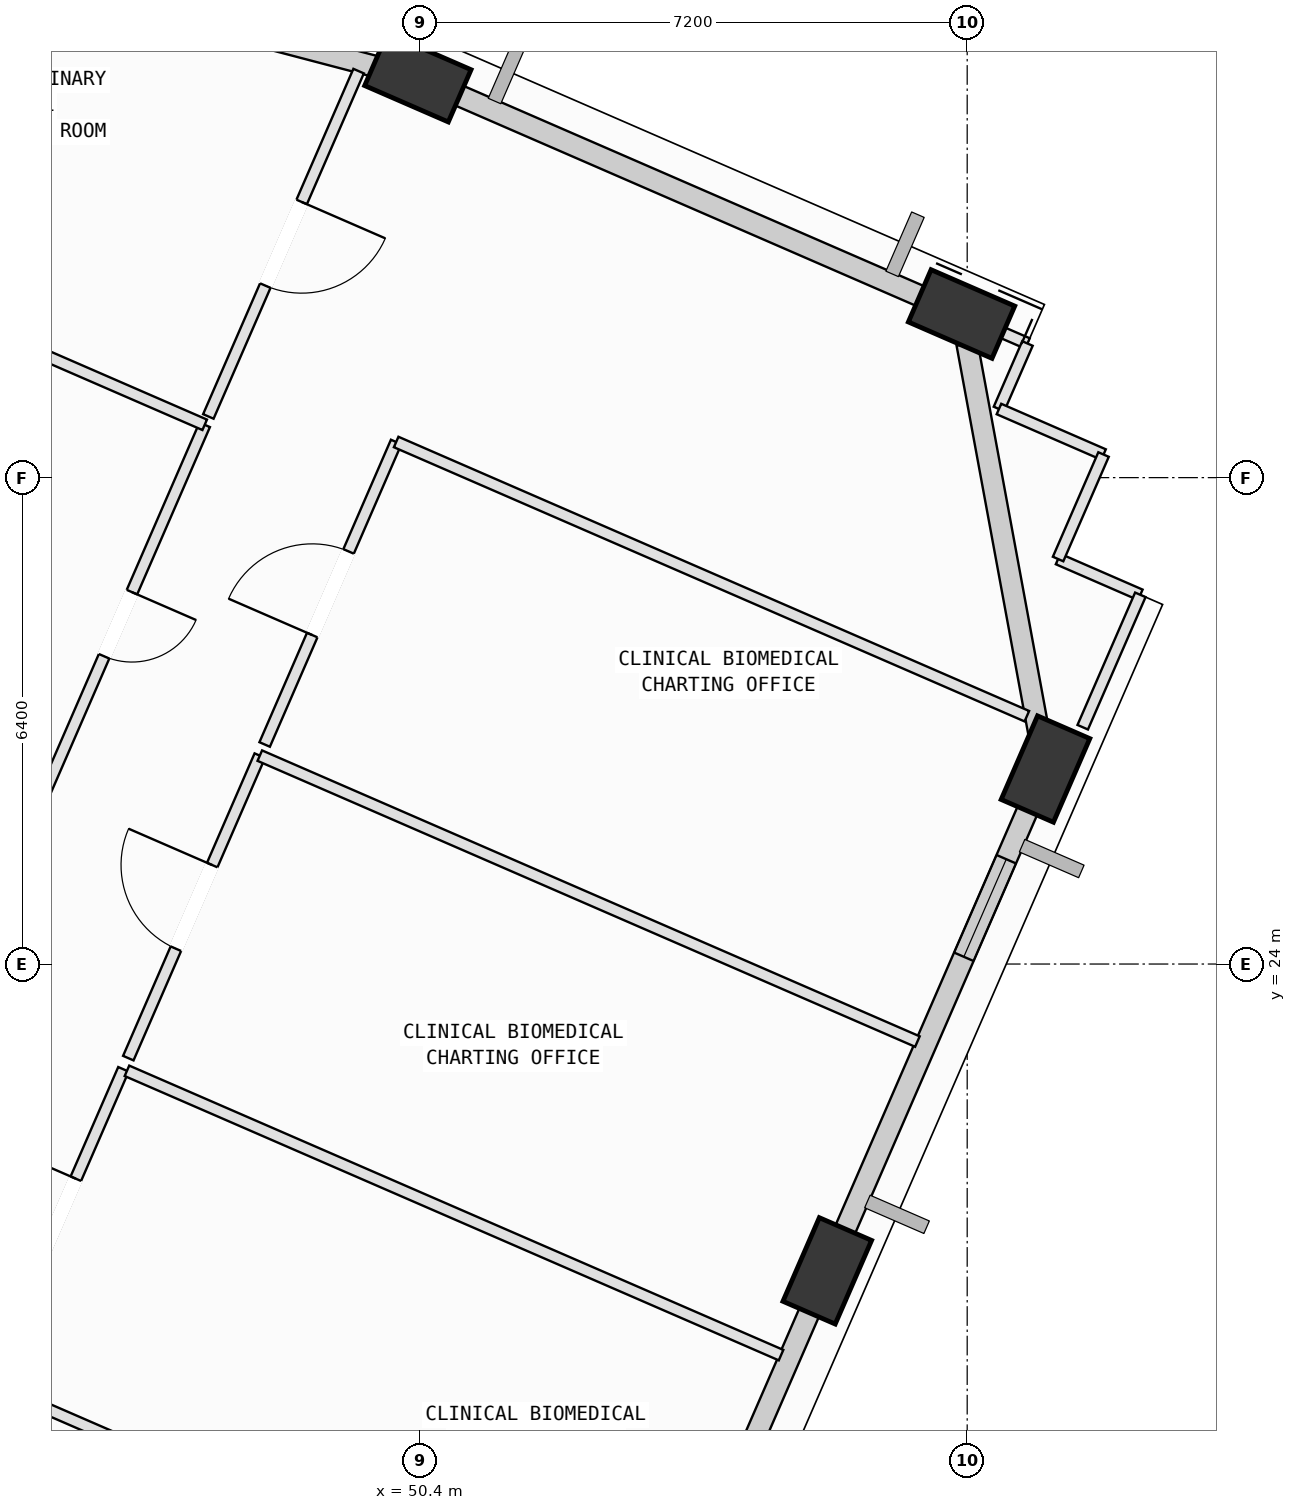
"""IFC4 building model, lengths in metres.
Left out: names, types, materials, properties, quantities, classifications, styles, units other than length and angle.
Written with IfcOpenShell. Run it as: python <this file> out.ifc"""

import sys

from ifc_helpers import new_model, si_unit, direction, frame, frame_2d, origin, origin_2d, place, context, subcontext, project, spatial, rectangle, extrude, element, fill, save


model = new_model("IFC4")
c1 = context("Model", 3, precision=1e-05, world=origin(), true_north=direction((0.0, 1.0)))
c2 = subcontext(c1, "Body", "Model", "MODEL_VIEW")
j1 = project(units=[si_unit("LENGTHUNIT", "METRE"), si_unit("PLANEANGLEUNIT", "RADIAN")], contexts=[c1])
p1 = place(None, origin())
s1 = spatial("IfcSite", under=j1, at=p1, CompositionType="ELEMENT")
p2 = place(p1, origin())
s2 = spatial("IfcBuilding", under=s1, at=p2, CompositionType="ELEMENT")
p3 = place(p2, frame((0.0, 0.0, 324.6)))
s3 = spatial("IfcBuildingStorey", under=s2, at=p3, CompositionType="ELEMENT", Elevation=324.6)
for number, where, z_axis, x_axis in (
    (1, (55.759, 19.963, 0.002), (0.0, 0.0, 1.0), (0.399, 0.917, 0.0)),
    (2, (58.63, 26.566, 0.002), (0.0, 0.0, 1.0), (0.399, 0.917, 0.0)),
    (3, (57.526, 32.553, 0.002), (0.0, 0.0, 1.0), (-0.917, 0.399, 0.0)),
    (4, (50.373, 35.663, 0.002), (0.0, 0.0, 1.0), (-0.917, 0.399, 0.0)),
):
    element("IfcColumn", number, at=place(p3, frame(where, z_axis=z_axis, x_axis=x_axis)), inside=s3, PredefinedType="COLUMN", context=c2, shape_type="SweptSolid", body=[
        extrude(rectangle(XDim=1.2, YDim=0.75, at=origin_2d()), origin(), (0.0, 0.0, 1.0), 3.996),
    ])
p4 = place(p3, frame((55.601, 19.598, 0.0), z_axis=(0.0, 0.0, 1.0), x_axis=(-0.398765026274, -0.917053135767, 0.0)))
e5 = element("IfcWall", 5, at=p4, inside=s3, PredefinedType="SOLIDWALL", context=c2, shape_type="SweptSolid", body=[
    extrude(rectangle(XDim=5.964, YDim=0.28, at=frame_2d((2.982, 0.0))), origin(), (0.0, 0.0, 1.0), 3.265),
])
p5 = place(p4, frame((2.032, 0.0, 0.75)))
e6 = element("IfcOpeningElement", 6, at=p5, cuts=e5, PredefinedType="OPENING", context=c2, shape_type="SweptSolid", body=[
    extrude(rectangle(XDim=2.0, YDim=1.95, at=frame_2d((1.0, 0.975))), frame((0.0, 0.15, 0.0), z_axis=(0.0, -1.0, 0.0), x_axis=(1.0, 0.0, 0.0)), (0.0, 0.0, 1.0), 0.3),
])
p6 = place(p3, frame((58.472, 26.201, 0.0), z_axis=(0.0, 0.0, 1.0), x_axis=(-0.398776286617, -0.917048239316, 0.0)))
e7 = element("IfcWall", 7, at=p6, inside=s3, PredefinedType="SOLIDWALL", context=c2, shape_type="SweptSolid", body=[
    extrude(rectangle(XDim=6.405, YDim=0.28, at=frame_2d((3.203, 0.0))), origin(), (0.0, 0.0, 1.0), 3.265),
])
p7 = place(p6, frame((0.896, 0.0, 0.75)))
e8 = element("IfcOpeningElement", 8, at=p7, cuts=e7, PredefinedType="OPENING", context=c2, shape_type="SweptSolid", body=[
    extrude(rectangle(XDim=1.4, YDim=1.85, at=frame_2d((0.7, 0.925))), frame((0.0, 0.15, 0.0), z_axis=(0.0, -1.0, 0.0), x_axis=(1.0, 0.0, 0.0)), (0.0, 0.0, 1.0), 0.3),
])
p8 = place(p3, frame((57.598, 32.162, 0.0), z_axis=(0.0, 0.0, 1.0), x_axis=(0.181421889976, -0.983405357845, 0.0)))
e9 = element("IfcWall", 9, at=p8, inside=s3, PredefinedType="SOLIDWALL", context=c2, shape_type="SweptSolid", body=[
    extrude(rectangle(XDim=5.293, YDim=0.28, at=frame_2d((2.646, 0.0))), origin(), (0.0, 0.0, 1.0), 3.265),
])
p9 = place(p3, frame((50.737, 35.504, 0.0), z_axis=(0.0, 0.0, 1.0), x_axis=(0.917057311373, -0.398755423359, 0.0)))
e10 = element("IfcWall", 10, at=p9, inside=s3, PredefinedType="SOLIDWALL", context=c2, shape_type="SweptSolid", body=[
    extrude(rectangle(XDim=7.005, YDim=0.28, at=frame_2d((3.502, 0.0))), origin(), (0.0, 0.0, 1.0), 3.265),
])
p10 = place(p3, frame((41.264, 38.054, 0.0), z_axis=(0.0, 0.0, 1.0), x_axis=(0.967228971308, -0.253905724755, 0.0)))
e11 = element("IfcWall", 11, at=p10, inside=s3, PredefinedType="SOLIDWALL", context=c2, shape_type="SweptSolid", body=[
    extrude(rectangle(XDim=9.02, YDim=0.28, at=frame_2d((4.51, 0.0))), origin(), (0.0, 0.0, 1.0), 3.265),
])
p11 = place(p3, frame((44.704, 18.489, 0.0), z_axis=(0.0, 0.0, 1.0), x_axis=(0.917075404025, -0.398713811315, 0.0)))
e12 = element("IfcWall", 12, at=p11, inside=s3, PredefinedType="PARTITIONING", context=c2, shape_type="SweptSolid", body=[
    extrude(rectangle(XDim=9.435, YDim=0.15, at=frame_2d((4.718, 0.0))), origin(), (0.0, 0.0, 1.0), 3.78),
])
p12 = place(p3, frame((44.768, 18.635, 0.0), z_axis=(0.0, 0.0, 1.0), x_axis=(0.398828954963, 0.91702533481, 0.0)))
e13 = element("IfcWall", 13, at=p12, inside=s3, PredefinedType="PARTITIONING", context=c2, shape_type="SweptSolid", body=[
    extrude(rectangle(XDim=4.34, YDim=0.15, at=frame_2d((2.17, 0.0))), origin(), (0.0, 0.0, 1.0), 3.415),
])
p13 = place(p12, frame((1.57, 0.0, 0.0)))
e14 = element("IfcOpeningElement", 14, at=p13, cuts=e13, PredefinedType="OPENING", context=c2, shape_type="SweptSolid", body=[
    extrude(rectangle(XDim=1.2, YDim=2.15, at=frame_2d((0.6, 1.075))), frame((0.0, 0.085, 0.0), z_axis=(0.0, -1.0, 0.0), x_axis=(1.0, 0.0, 0.0)), (0.0, 0.0, 1.0), 0.17),
])
p14 = place(p3, frame((46.545, 22.595, 0.0), z_axis=(0.0, 0.0, 1.0), x_axis=(0.917099421132, -0.39865856539, 0.0)))
e15 = element("IfcWall", 15, at=p14, inside=s3, PredefinedType="PARTITIONING", context=c2, shape_type="SweptSolid", body=[
    extrude(rectangle(XDim=9.384, YDim=0.15, at=frame_2d((4.692, 0.0))), origin(), (0.0, 0.0, 1.0), 3.78),
])
p15 = place(p3, frame((46.563, 22.762, 0.0), z_axis=(0.0, 0.0, 1.0), x_axis=(0.398639711207, 0.917107616722, 0.0)))
e16 = element("IfcWall", 16, at=p15, inside=s3, PredefinedType="PARTITIONING", context=c2, shape_type="SweptSolid", body=[
    extrude(rectangle(XDim=4.34, YDim=0.15, at=frame_2d((2.17, 0.0))), origin(), (0.0, 0.0, 1.0), 3.415),
])
p16 = place(p15, frame((1.57, 0.0, 0.0)))
e17 = element("IfcOpeningElement", 17, at=p16, cuts=e16, PredefinedType="OPENING", context=c2, shape_type="SweptSolid", body=[
    extrude(rectangle(XDim=1.2, YDim=2.15, at=frame_2d((0.6, 1.075))), frame((0.0, 0.085, 0.0), z_axis=(0.0, -1.0, 0.0), x_axis=(1.0, 0.0, 0.0)), (0.0, 0.0, 1.0), 0.17),
])
p17 = place(p3, frame((48.293, 26.742, 0.0), z_axis=(0.0, 0.0, 1.0), x_axis=(0.917063062267, -0.398742197197, 0.0)))
e18 = element("IfcWall", 18, at=p17, inside=s3, PredefinedType="PARTITIONING", context=c2, shape_type="SweptSolid", body=[
    extrude(rectangle(XDim=9.435, YDim=0.15, at=frame_2d((4.717, 0.0))), origin(), (0.0, 0.0, 1.0), 3.78),
])
p18 = place(p3, frame((56.128, 20.236, 0.0), z_axis=(0.0, 0.0, 1.0), x_axis=(-0.398658726612, -0.91709935105, 0.0)))
e19 = element("IfcWall", 19, at=p18, inside=s3, PredefinedType="PARTITIONING", context=c2, shape_type="SweptSolid", body=[
    extrude(rectangle(XDim=0.795, YDim=0.15, at=frame_2d((0.397, 0.0))), origin(), (0.0, 0.0, 1.0), 3.265),
])
p19 = place(p3, frame((48.357, 26.889, 0.0), z_axis=(0.0, 0.0, 1.0), x_axis=(0.398639711207, 0.917107616722, 0.0)))
e20 = element("IfcWall", 20, at=p19, inside=s3, PredefinedType="PARTITIONING", context=c2, shape_type="SweptSolid", body=[
    extrude(rectangle(XDim=4.34, YDim=0.15, at=frame_2d((2.17, 0.0))), origin(), (0.0, 0.0, 1.0), 3.78),
])
p20 = place(p19, frame((1.57, 0.0, 0.0)))
e21 = element("IfcOpeningElement", 21, at=p20, cuts=e20, PredefinedType="OPENING", context=c2, shape_type="SweptSolid", body=[
    extrude(rectangle(XDim=1.2, YDim=2.15, at=frame_2d((0.6, 1.075))), frame((0.0, 0.085, 0.0), z_axis=(0.0, -1.0, 0.0), x_axis=(1.0, 0.0, 0.0)), (0.0, 0.0, 1.0), 0.17),
])
p21 = place(p3, frame((50.087, 30.869, 0.0), z_axis=(0.0, 0.0, 1.0), x_axis=(0.917068340421, -0.398730057805, 0.0)))
e22 = element("IfcWall", 22, at=p21, inside=s3, PredefinedType="PARTITIONING", context=c2, shape_type="SweptSolid", body=[
    extrude(rectangle(XDim=9.049, YDim=0.15, at=frame_2d((4.524, 0.0))), origin(), (0.0, 0.0, 1.0), 3.78),
])
p22 = place(p3, frame((59.056, 26.969, 0.0), z_axis=(0.0, 0.0, 1.0), x_axis=(-0.399259700559, -0.91683787635, 0.0)))
e23 = element("IfcWall", 23, at=p22, inside=s3, PredefinedType="PARTITIONING", context=c2, shape_type="SweptSolid", body=[
    extrude(rectangle(XDim=0.937, YDim=0.15, at=frame_2d((0.468, 0.0))), origin(), (0.0, 0.0, 1.0), 3.265),
])
p23 = place(p3, frame((58.796, 29.329, 0.0), z_axis=(0.0, 0.0, 1.0), x_axis=(0.916839684451, -0.399255548509, 0.0)))
e24 = element("IfcWall", 24, at=p23, inside=s3, PredefinedType="PARTITIONING", context=c2, shape_type="SweptSolid", body=[
    extrude(rectangle(XDim=1.18, YDim=0.15, at=frame_2d((0.59, 0.0))), origin(), (0.0, 0.0, 1.0), 3.78),
])
p24 = place(p3, frame((59.878, 28.858, 0.0), z_axis=(0.0, 0.0, 1.0), x_axis=(-0.39892347819, -0.916984219357, 0.0)))
e25 = element("IfcWall", 25, at=p24, inside=s3, PredefinedType="PARTITIONING", context=c2, shape_type="SweptSolid", body=[
    extrude(rectangle(XDim=1.9, YDim=0.15, at=frame_2d((0.95, 0.0))), origin(), (0.0, 0.0, 1.0), 3.78),
])
p25 = place(p3, frame((57.157, 32.702, 0.0), z_axis=(0.0, 0.0, 1.0), x_axis=(0.917222637379, -0.398374991032, 0.0)))
e26 = element("IfcWall", 26, at=p25, inside=s3, PredefinedType="PARTITIONING", context=c2, shape_type="SweptSolid", body=[
    extrude(rectangle(XDim=1.348, YDim=0.15, at=frame_2d((0.674, 0.0))), origin(), (0.0, 0.0, 1.0), 3.265),
])
p26 = place(p3, frame((58.393, 32.165, 0.0), z_axis=(0.0, 0.0, 1.0), x_axis=(-0.39889703488, -0.916995722762, 0.0)))
e27 = element("IfcWall", 27, at=p26, inside=s3, PredefinedType="PARTITIONING", context=c2, shape_type="SweptSolid", body=[
    extrude(rectangle(XDim=0.94, YDim=0.15, at=frame_2d((0.47, 0.0))), origin(), (0.0, 0.0, 1.0), 3.78),
])
p27 = place(p3, frame((58.018, 31.303, 0.0), z_axis=(0.0, 0.0, 1.0), x_axis=(0.91691738696, -0.399077067107, 0.0)))
e28 = element("IfcWall", 28, at=p27, inside=s3, PredefinedType="PARTITIONING", context=c2, shape_type="SweptSolid", body=[
    extrude(rectangle(XDim=1.501, YDim=0.15, at=frame_2d((0.75, 0.0))), origin(), (0.0, 0.0, 1.0), 3.78),
])
p28 = place(p3, frame((59.394, 30.704, 0.0), z_axis=(0.0, 0.0, 1.0), x_axis=(-0.398904712107, -0.916992383097, 0.0)))
e29 = element("IfcWall", 29, at=p28, inside=s3, PredefinedType="PARTITIONING", context=c2, shape_type="SweptSolid", body=[
    extrude(rectangle(XDim=1.5, YDim=0.15, at=frame_2d((0.75, 0.0))), origin(), (0.0, 0.0, 1.0), 3.78),
])
p29 = place(p3, frame((47.568, 31.095, 0.0), z_axis=(0.0, 0.0, 1.0), x_axis=(-0.398677741034, -0.917091085337, 0.0)))
e30 = element("IfcWall", 30, at=p29, inside=s3, PredefinedType="PARTITIONING", context=c2, shape_type="SweptSolid", body=[
    extrude(rectangle(XDim=5.721, YDim=0.15, at=frame_2d((2.861, 0.0))), origin(), (0.0, 0.0, 1.0), 3.78),
])
p30 = place(p29, frame((2.401, 0.0, 0.0)))
e31 = element("IfcOpeningElement", 31, at=p30, cuts=e30, PredefinedType="OPENING", context=c2, shape_type="SweptSolid", body=[
    extrude(rectangle(XDim=0.92, YDim=2.1, at=frame_2d((0.46, 1.05))), frame((0.0, 0.085, 0.0), z_axis=(0.0, -1.0, 0.0), x_axis=(1.0, 0.0, 0.0)), (0.0, 0.0, 1.0), 0.17),
])
p31 = place(p3, frame((39.466, 34.618, 0.0), z_axis=(0.0, 0.0, 1.0), x_axis=(0.917056875857, -0.398756424957, 0.0)))
e32 = element("IfcWall", 32, at=p31, inside=s3, PredefinedType="PARTITIONING", context=c2, shape_type="SweptSolid", body=[
    extrude(rectangle(XDim=8.835, YDim=0.15, at=frame_2d((4.417, 0.0))), origin(), (0.0, 0.0, 1.0), 3.78),
])
p32 = place(p3, frame((49.593, 35.749, 0.0), z_axis=(0.0, 0.0, 1.0), x_axis=(-0.398967500085, -0.916965066879, 0.0)))
e33 = element("IfcWall", 33, at=p32, inside=s3, PredefinedType="PARTITIONING", context=c2, shape_type="SweptSolid", body=[
    extrude(rectangle(XDim=4.955, YDim=0.15, at=frame_2d((2.478, 0.0))), origin(), (0.0, 0.0, 1.0), 2.765),
])
p33 = place(p32, frame((1.878, 0.0, 0.0)))
e34 = element("IfcOpeningElement", 34, at=p33, cuts=e33, PredefinedType="OPENING", context=c2, shape_type="SweptSolid", body=[
    extrude(rectangle(XDim=1.2, YDim=2.15, at=frame_2d((0.6, 1.075))), frame((0.0, 0.085, 0.0), z_axis=(0.0, -1.0, 0.0), x_axis=(1.0, 0.0, 0.0)), (0.0, 0.0, 1.0), 0.17),
])
p34 = place(p7, origin())
e35 = element("IfcWindow", 35, at=p34, inside=s3, PartitioningType="SINGLE_PANEL", PredefinedType="WINDOW", context=c2, shape_type="SweptSolid", body=[
    extrude(rectangle(XDim=1.4, YDim=1.85, at=frame_2d((0.7, 0.925))), frame((0.0, 0.03, 0.0), z_axis=(0.0, -1.0, 0.0), x_axis=(1.0, 0.0, 0.0)), (0.0, 0.0, 1.0), 0.06),
])
fill(e8, e35)
p35 = place(p13, origin())
e36 = element("IfcDoor", 36, at=p35, inside=s3, OperationType="SINGLE_SWING_RIGHT", PredefinedType="DOOR", context=c2, shape_type="SweptSolid", body=[
    extrude(rectangle(XDim=1.2, YDim=2.15, at=frame_2d((0.6, 1.075))), frame((0.0, 0.025, 0.0), z_axis=(0.0, -1.0, 0.0), x_axis=(1.0, 0.0, 0.0)), (0.0, 0.0, 1.0), 0.05),
])
fill(e14, e36)
p36 = place(p16, origin())
e37 = element("IfcDoor", 37, at=p36, inside=s3, OperationType="SINGLE_SWING_RIGHT", PredefinedType="DOOR", context=c2, shape_type="SweptSolid", body=[
    extrude(rectangle(XDim=1.2, YDim=2.15, at=frame_2d((0.6, 1.075))), frame((0.0, 0.025, 0.0), z_axis=(0.0, -1.0, 0.0), x_axis=(1.0, 0.0, 0.0)), (0.0, 0.0, 1.0), 0.05),
])
fill(e17, e37)
p37 = place(p20, origin())
e38 = element("IfcDoor", 38, at=p37, inside=s3, OperationType="SINGLE_SWING_LEFT", PredefinedType="DOOR", context=c2, shape_type="SweptSolid", body=[
    extrude(rectangle(XDim=1.2, YDim=2.15, at=frame_2d((0.6, 1.075))), frame((0.0, 0.025, 0.0), z_axis=(0.0, -1.0, 0.0), x_axis=(1.0, 0.0, 0.0)), (0.0, 0.0, 1.0), 0.05),
])
fill(e21, e38)
p38 = place(p30, origin())
e39 = element("IfcDoor", 39, at=p38, inside=s3, OperationType="SINGLE_SWING_LEFT", PredefinedType="DOOR", context=c2, shape_type="SweptSolid", body=[
    extrude(rectangle(XDim=0.92, YDim=2.1, at=frame_2d((0.46, 1.05))), frame((0.0, 0.025, 0.0), z_axis=(0.0, -1.0, 0.0), x_axis=(1.0, 0.0, 0.0)), (0.0, 0.0, 1.0), 0.05),
])
fill(e31, e39)
p39 = place(p33, origin())
e40 = element("IfcDoor", 40, at=p39, inside=s3, OperationType="SINGLE_SWING_LEFT", PredefinedType="DOOR", context=c2, shape_type="SweptSolid", body=[
    extrude(rectangle(XDim=1.2, YDim=2.15, at=frame_2d((0.6, 1.075))), frame((0.0, 0.025, 0.0), z_axis=(0.0, -1.0, 0.0), x_axis=(1.0, 0.0, 0.0)), (0.0, 0.0, 1.0), 0.05),
])
fill(e34, e40)
save(model, sys.argv[1])
